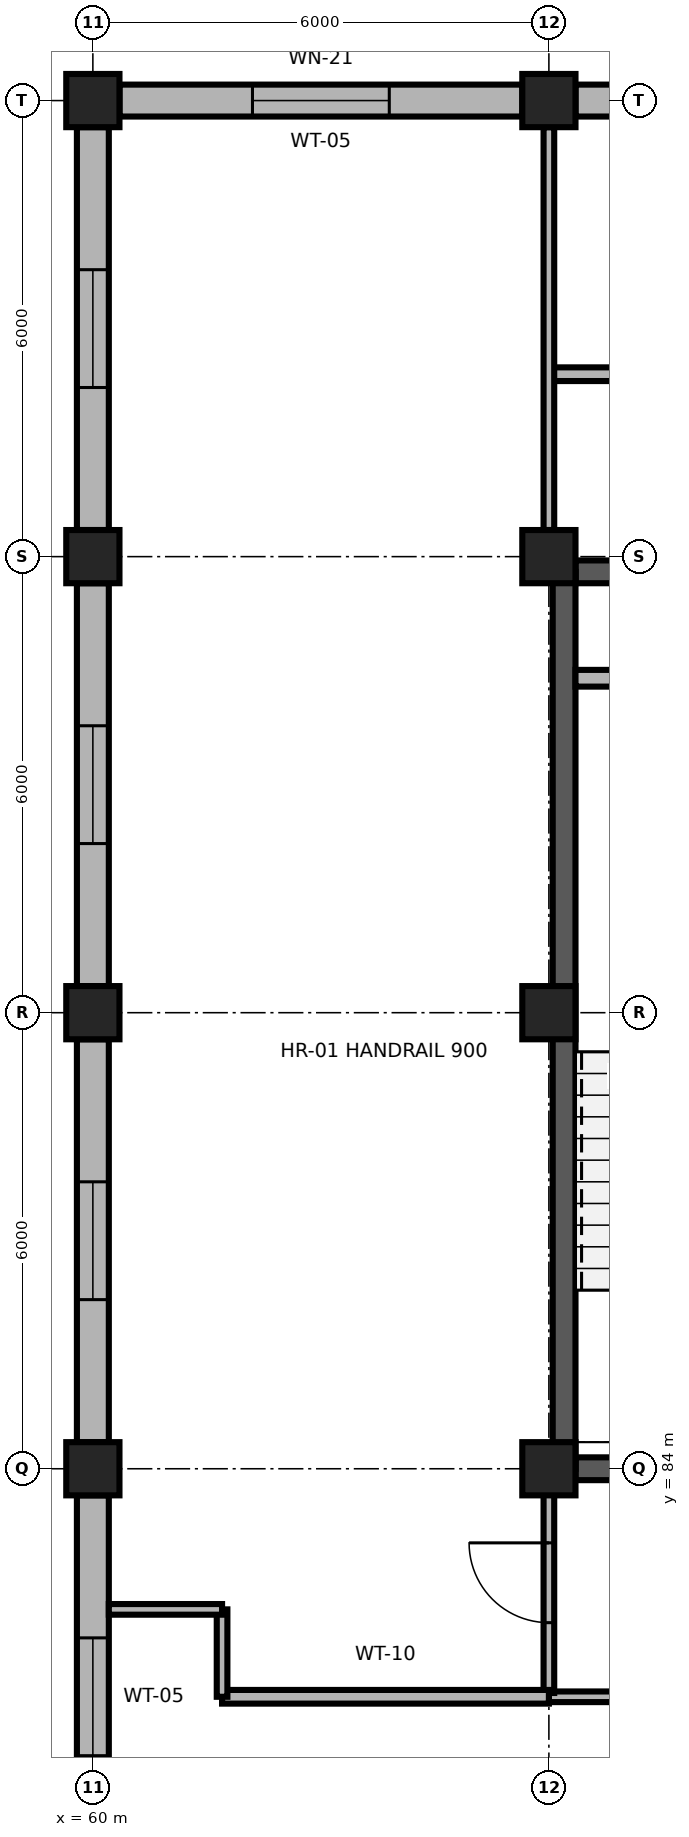
"""IFC4 building model, lengths in metres.
Left out: names, types, materials, properties, quantities, classifications, styles, units other than length and angle.
Written with IfcOpenShell. Run it as: python <this file> out.ifc"""

import sys

from ifc_helpers import new_model, si_unit, direction, frame, frame_2d, origin, origin_2d, place, context, subcontext, project, spatial, rectangle, extrude, element, fill, save


model = new_model("IFC4")
c1 = context("Model", 3, precision=1e-05, world=origin(), true_north=direction((0.0, 1.0)))
c2 = subcontext(c1, "Body", "Model", "MODEL_VIEW")
j1 = project(units=[si_unit("LENGTHUNIT", "METRE"), si_unit("PLANEANGLEUNIT", "RADIAN")], contexts=[c1])
p1 = place(None, origin())
s1 = spatial("IfcSite", under=j1, at=p1, CompositionType="ELEMENT")
p2 = place(p1, origin())
s2 = spatial("IfcBuilding", under=s1, at=p2, CompositionType="ELEMENT")
p3 = place(p2, frame((0.0, 0.0, 56.1)))
s3 = spatial("IfcBuildingStorey", under=s2, at=p3, CompositionType="ELEMENT", Elevation=56.1)
for number, where, z_axis, x_axis in (
    (1, (60.0, 84.0, 0.0), (0.0, 0.0, 1.0), (1.0, 0.0, 0.0)),
    (2, (66.0, 84.0, 0.0), (0.0, 0.0, 1.0), (1.0, 0.0, 0.0)),
    (3, (60.0, 90.0, 0.0), (0.0, 0.0, 1.0), (1.0, 0.0, 0.0)),
    (4, (66.0, 90.0, 0.0), (0.0, 0.0, 1.0), (1.0, 0.0, 0.0)),
    (5, (60.0, 96.0, 0.0), (0.0, 0.0, 1.0), (1.0, 0.0, 0.0)),
    (6, (66.0, 96.0, 0.0), (0.0, 0.0, 1.0), (1.0, 0.0, 0.0)),
    (7, (60.0, 102.0, 0.0), (0.0, 0.0, 1.0), (1.0, 0.0, 0.0)),
    (8, (66.0, 102.0, 0.0), (0.0, 0.0, 1.0), (1.0, 0.0, 0.0)),
):
    element("IfcColumn", number, at=place(p3, frame(where, z_axis=z_axis, x_axis=x_axis)), inside=s3, PredefinedType="COLUMN", context=c2, shape_type="SweptSolid", body=[
        extrude(rectangle(XDim=0.7, YDim=0.7, at=origin_2d()), origin(), (0.0, 0.0, 1.0), 3.9),
    ])
p4 = place(p3, frame((60.35, 102.0, 0.0), z_axis=(0.0, 0.0, 1.0), x_axis=(1.0, 0.0, 0.0)))
e9 = element("IfcWall", 9, at=p4, inside=s3, PredefinedType="SOLIDWALL", context=c2, shape_type="SweptSolid", body=[
    extrude(rectangle(XDim=5.3, YDim=0.42, at=frame_2d((2.65, 0.0))), origin(), (0.0, 0.0, 1.0), 3.32),
])
p5 = place(p4, frame((1.75, 0.0, 0.85)))
e10 = element("IfcOpeningElement", 10, at=p5, cuts=e9, PredefinedType="OPENING", context=c2, shape_type="SweptSolid", body=[
    extrude(rectangle(XDim=1.8, YDim=1.95, at=frame_2d((0.9, 0.975))), frame((0.0, 0.225, 0.0), z_axis=(0.0, -1.0, 0.0), x_axis=(1.0, 0.0, 0.0)), (0.0, 0.0, 1.0), 0.45),
])
p6 = place(p3, frame((66.35, 102.0, 0.0), z_axis=(0.0, 0.0, 1.0), x_axis=(1.0, 0.0, 0.0)))
e11 = element("IfcWall", 11, at=p6, inside=s3, PredefinedType="SOLIDWALL", context=c2, shape_type="SweptSolid", body=[
    extrude(rectangle(XDim=5.3, YDim=0.42, at=frame_2d((2.65, 0.0))), origin(), (0.0, 0.0, 1.0), 3.32),
])
p7 = place(p6, frame((1.75, 0.0, 0.85)))
e12 = element("IfcOpeningElement", 12, at=p7, cuts=e11, PredefinedType="OPENING", context=c2, shape_type="SweptSolid", body=[
    extrude(rectangle(XDim=1.8, YDim=1.95, at=frame_2d((0.9, 0.975))), frame((0.0, 0.225, 0.0), z_axis=(0.0, -1.0, 0.0), x_axis=(1.0, 0.0, 0.0)), (0.0, 0.0, 1.0), 0.45),
])
p8 = place(p3, frame((60.0, 78.35, 0.0), z_axis=(0.0, 0.0, 1.0), x_axis=(0.0, 1.0, 0.0)))
e13 = element("IfcWall", 13, at=p8, inside=s3, PredefinedType="SOLIDWALL", context=c2, shape_type="SweptSolid", body=[
    extrude(rectangle(XDim=5.3, YDim=0.42, at=frame_2d((2.65, 0.0))), origin(), (0.0, 0.0, 1.0), 3.32),
])
p9 = place(p8, frame((1.875, 0.0, 0.85)))
e14 = element("IfcOpeningElement", 14, at=p9, cuts=e13, PredefinedType="OPENING", context=c2, shape_type="SweptSolid", body=[
    extrude(rectangle(XDim=1.55, YDim=1.9, at=frame_2d((0.775, 0.95))), frame((0.0, 0.225, 0.0), z_axis=(0.0, -1.0, 0.0), x_axis=(1.0, 0.0, 0.0)), (0.0, 0.0, 1.0), 0.45),
])
p10 = place(p3, frame((60.0, 84.35, 0.0), z_axis=(0.0, 0.0, 1.0), x_axis=(0.0, 1.0, 0.0)))
e15 = element("IfcWall", 15, at=p10, inside=s3, PredefinedType="SOLIDWALL", context=c2, shape_type="SweptSolid", body=[
    extrude(rectangle(XDim=5.3, YDim=0.42, at=frame_2d((2.65, 0.0))), origin(), (0.0, 0.0, 1.0), 3.32),
])
p11 = place(p10, frame((1.875, 0.0, 0.85)))
e16 = element("IfcOpeningElement", 16, at=p11, cuts=e15, PredefinedType="OPENING", context=c2, shape_type="SweptSolid", body=[
    extrude(rectangle(XDim=1.55, YDim=1.9, at=frame_2d((0.775, 0.95))), frame((0.0, 0.225, 0.0), z_axis=(0.0, -1.0, 0.0), x_axis=(1.0, 0.0, 0.0)), (0.0, 0.0, 1.0), 0.45),
])
p12 = place(p3, frame((60.0, 90.35, 0.0), z_axis=(0.0, 0.0, 1.0), x_axis=(0.0, 1.0, 0.0)))
e17 = element("IfcWall", 17, at=p12, inside=s3, PredefinedType="SOLIDWALL", context=c2, shape_type="SweptSolid", body=[
    extrude(rectangle(XDim=5.3, YDim=0.42, at=frame_2d((2.65, 0.0))), origin(), (0.0, 0.0, 1.0), 3.32),
])
p13 = place(p12, frame((1.875, 0.0, 0.85)))
e18 = element("IfcOpeningElement", 18, at=p13, cuts=e17, PredefinedType="OPENING", context=c2, shape_type="SweptSolid", body=[
    extrude(rectangle(XDim=1.55, YDim=1.9, at=frame_2d((0.775, 0.95))), frame((0.0, 0.225, 0.0), z_axis=(0.0, -1.0, 0.0), x_axis=(1.0, 0.0, 0.0)), (0.0, 0.0, 1.0), 0.45),
])
p14 = place(p3, frame((60.0, 96.35, 0.0), z_axis=(0.0, 0.0, 1.0), x_axis=(0.0, 1.0, 0.0)))
e19 = element("IfcWall", 19, at=p14, inside=s3, PredefinedType="SOLIDWALL", context=c2, shape_type="SweptSolid", body=[
    extrude(rectangle(XDim=5.3, YDim=0.42, at=frame_2d((2.65, 0.0))), origin(), (0.0, 0.0, 1.0), 3.32),
])
p15 = place(p14, frame((1.875, 0.0, 0.85)))
e20 = element("IfcOpeningElement", 20, at=p15, cuts=e19, PredefinedType="OPENING", context=c2, shape_type="SweptSolid", body=[
    extrude(rectangle(XDim=1.55, YDim=1.9, at=frame_2d((0.775, 0.95))), frame((0.0, 0.225, 0.0), z_axis=(0.0, -1.0, 0.0), x_axis=(1.0, 0.0, 0.0)), (0.0, 0.0, 1.0), 0.45),
])
p16 = place(p3, frame((66.35, 84.0, 0.0), z_axis=(0.0, 0.0, 1.0), x_axis=(1.0, 0.0, 0.0)))
e21 = element("IfcWall", 21, at=p16, inside=s3, PredefinedType="SHEAR", context=c2, shape_type="SweptSolid", body=[
    extrude(rectangle(XDim=5.3, YDim=0.3, at=frame_2d((2.65, 0.0))), origin(), (0.0, 0.0, 1.0), 3.66),
])
p17 = place(p16, frame((1.975, 0.0, 0.0)))
e22 = element("IfcOpeningElement", 22, at=p17, cuts=e21, PredefinedType="OPENING", context=c2, shape_type="SweptSolid", body=[
    extrude(rectangle(XDim=1.35, YDim=2.2, at=frame_2d((0.675, 1.1))), frame((0.0, 0.165, 0.0), z_axis=(0.0, -1.0, 0.0), x_axis=(1.0, 0.0, 0.0)), (0.0, 0.0, 1.0), 0.33),
])
p18 = place(p3, frame((66.35, 95.8, 0.0), z_axis=(0.0, 0.0, 1.0), x_axis=(1.0, 0.0, 0.0)))
e23 = element("IfcWall", 23, at=p18, inside=s3, PredefinedType="SHEAR", context=c2, shape_type="SweptSolid", body=[
    extrude(rectangle(XDim=5.3, YDim=0.3, at=frame_2d((2.65, 0.0))), origin(), (0.0, 0.0, 1.0), 3.74),
])
p19 = place(p3, frame((66.2, 84.0, 0.0), z_axis=(0.0, 0.0, 1.0), x_axis=(0.0, 1.0, 0.0)))
e24 = element("IfcWall", 24, at=p19, inside=s3, PredefinedType="SHEAR", context=c2, shape_type="SweptSolid", body=[
    extrude(rectangle(XDim=11.8, YDim=0.3, at=frame_2d((5.9, 0.0))), origin(), (0.0, 0.0, 1.0), 3.74),
])
p20 = place(p3, frame((66.35, 94.4, 0.0), z_axis=(0.0, 0.0, 1.0), x_axis=(1.0, 0.0, 0.0)))
e25 = element("IfcWall", 25, at=p20, inside=s3, PredefinedType="PARTITIONING", context=c2, shape_type="SweptSolid", body=[
    extrude(rectangle(XDim=1.1, YDim=0.22, at=frame_2d((0.55, 0.0))), origin(), (0.0, 0.0, 1.0), 3.74),
])
p21 = place(p3, frame((66.0, 81.0, 0.0), z_axis=(0.0, 0.0, 1.0), x_axis=(1.0, 0.0, 0.0)))
e26 = element("IfcWall", 26, at=p21, inside=s3, PredefinedType="PARTITIONING", context=c2, shape_type="SweptSolid", body=[
    extrude(rectangle(XDim=6.0, YDim=0.14, at=frame_2d((3.0, 0.0))), origin(), (0.0, 0.0, 1.0), 3.74),
])
p22 = place(p21, frame((2.15, 0.0, 0.0)))
e27 = element("IfcOpeningElement", 27, at=p22, cuts=e26, PredefinedType="OPENING", context=c2, shape_type="SweptSolid", body=[
    extrude(rectangle(XDim=1.7, YDim=2.45, at=frame_2d((0.85, 1.225))), frame((0.0, 0.085, 0.0), z_axis=(0.0, -1.0, 0.0), x_axis=(1.0, 0.0, 0.0)), (0.0, 0.0, 1.0), 0.17),
])
p23 = place(p3, frame((66.0, 81.05, 0.0), z_axis=(0.0, 0.0, 1.0), x_axis=(0.0, 1.0, 0.0)))
e28 = element("IfcWall", 28, at=p23, inside=s3, PredefinedType="PARTITIONING", context=c2, shape_type="SweptSolid", body=[
    extrude(rectangle(XDim=2.9, YDim=0.14, at=frame_2d((1.45, 0.0))), origin(), (0.0, 0.0, 1.0), 3.449),
])
p24 = place(p23, frame((0.925, 0.0, 0.0)))
e29 = element("IfcOpeningElement", 29, at=p24, cuts=e28, PredefinedType="OPENING", context=c2, shape_type="SweptSolid", body=[
    extrude(rectangle(XDim=1.05, YDim=2.25, at=frame_2d((0.525, 1.125))), frame((0.0, 0.085, 0.0), z_axis=(0.0, -1.0, 0.0), x_axis=(1.0, 0.0, 0.0)), (0.0, 0.0, 1.0), 0.17),
])
p25 = place(p3, frame((61.7, 81.0, 0.0), z_axis=(0.0, 0.0, 1.0), x_axis=(1.0, 0.0, 0.0)))
e30 = element("IfcWall", 30, at=p25, inside=s3, PredefinedType="PARTITIONING", context=c2, shape_type="SweptSolid", body=[
    extrude(rectangle(XDim=4.3, YDim=0.18, at=frame_2d((2.15, 0.0))), origin(), (0.0, 0.0, 1.0), 3.74),
])
p26 = place(p3, frame((61.7, 81.0, 0.0), z_axis=(0.0, 0.0, 1.0), x_axis=(0.0, 1.0, 0.0)))
e31 = element("IfcWall", 31, at=p26, inside=s3, PredefinedType="PARTITIONING", context=c2, shape_type="SweptSolid", body=[
    extrude(rectangle(XDim=1.15, YDim=0.14, at=frame_2d((0.575, 0.0))), origin(), (0.0, 0.0, 1.0), 3.74),
])
p27 = place(p3, frame((61.7, 82.15, 0.0), z_axis=(0.0, 0.0, 1.0), x_axis=(-1.0, 0.0, 0.0)))
e32 = element("IfcWall", 32, at=p27, inside=s3, PredefinedType="PARTITIONING", context=c2, shape_type="SweptSolid", body=[
    extrude(rectangle(XDim=1.49, YDim=0.14, at=frame_2d((0.745, 0.0))), origin(), (0.0, 0.0, 1.0), 3.74),
])
p28 = place(p3, frame((66.0, 98.4, 0.0), z_axis=(0.0, 0.0, 1.0), x_axis=(1.0, 0.0, 0.0)))
e33 = element("IfcWall", 33, at=p28, inside=s3, PredefinedType="PARTITIONING", context=c2, shape_type="SweptSolid", body=[
    extrude(rectangle(XDim=6.0, YDim=0.18, at=frame_2d((3.0, 0.0))), origin(), (0.0, 0.0, 1.0), 3.74),
])
p29 = place(p3, frame((66.0, 96.35, 0.0), z_axis=(0.0, 0.0, 1.0), x_axis=(0.0, 1.0, 0.0)))
e34 = element("IfcWall", 34, at=p29, inside=s3, PredefinedType="PARTITIONING", context=c2, shape_type="SweptSolid", body=[
    extrude(rectangle(XDim=5.3, YDim=0.14, at=frame_2d((2.65, 0.0))), origin(), (0.0, 0.0, 1.0), 3.449),
])
p30 = place(p5, origin())
e35 = element("IfcWindow", 35, at=p30, inside=s3, PartitioningType="SINGLE_PANEL", PredefinedType="WINDOW", context=c2, shape_type="SweptSolid", body=[
    extrude(rectangle(XDim=1.8, YDim=1.95, at=frame_2d((0.9, 0.975))), frame((0.0, 0.03, 0.0), z_axis=(0.0, -1.0, 0.0), x_axis=(1.0, 0.0, 0.0)), (0.0, 0.0, 1.0), 0.06),
])
fill(e10, e35)
p31 = place(p9, origin())
e36 = element("IfcWindow", 36, at=p31, inside=s3, PartitioningType="SINGLE_PANEL", PredefinedType="WINDOW", context=c2, shape_type="SweptSolid", body=[
    extrude(rectangle(XDim=1.55, YDim=1.9, at=frame_2d((0.775, 0.95))), frame((0.0, 0.03, 0.0), z_axis=(0.0, -1.0, 0.0), x_axis=(1.0, 0.0, 0.0)), (0.0, 0.0, 1.0), 0.06),
])
fill(e14, e36)
p32 = place(p11, origin())
e37 = element("IfcWindow", 37, at=p32, inside=s3, PartitioningType="SINGLE_PANEL", PredefinedType="WINDOW", context=c2, shape_type="SweptSolid", body=[
    extrude(rectangle(XDim=1.55, YDim=1.9, at=frame_2d((0.775, 0.95))), frame((0.0, 0.03, 0.0), z_axis=(0.0, -1.0, 0.0), x_axis=(1.0, 0.0, 0.0)), (0.0, 0.0, 1.0), 0.06),
])
fill(e16, e37)
p33 = place(p13, origin())
e38 = element("IfcWindow", 38, at=p33, inside=s3, PartitioningType="SINGLE_PANEL", PredefinedType="WINDOW", context=c2, shape_type="SweptSolid", body=[
    extrude(rectangle(XDim=1.55, YDim=1.9, at=frame_2d((0.775, 0.95))), frame((0.0, 0.03, 0.0), z_axis=(0.0, -1.0, 0.0), x_axis=(1.0, 0.0, 0.0)), (0.0, 0.0, 1.0), 0.06),
])
fill(e18, e38)
p34 = place(p15, origin())
e39 = element("IfcWindow", 39, at=p34, inside=s3, PartitioningType="SINGLE_PANEL", PredefinedType="WINDOW", context=c2, shape_type="SweptSolid", body=[
    extrude(rectangle(XDim=1.55, YDim=1.9, at=frame_2d((0.775, 0.95))), frame((0.0, 0.03, 0.0), z_axis=(0.0, -1.0, 0.0), x_axis=(1.0, 0.0, 0.0)), (0.0, 0.0, 1.0), 0.06),
])
fill(e20, e39)
p35 = place(p24, origin())
e40 = element("IfcDoor", 40, at=p35, inside=s3, OperationType="SINGLE_SWING_RIGHT", PredefinedType="DOOR", context=c2, shape_type="SweptSolid", body=[
    extrude(rectangle(XDim=1.05, YDim=2.25, at=frame_2d((0.525, 1.125))), frame((0.0, 0.025, 0.0), z_axis=(0.0, -1.0, 0.0), x_axis=(1.0, 0.0, 0.0)), (0.0, 0.0, 1.0), 0.05),
])
fill(e29, e40)
save(model, sys.argv[1])
